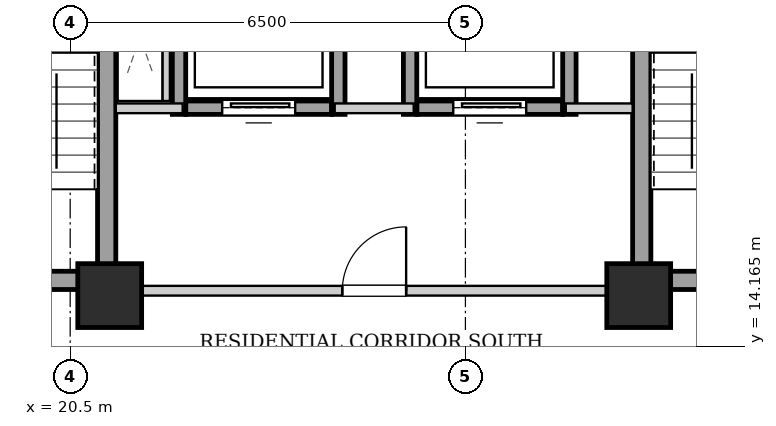
"""IFC4 building model, lengths in metres.
Left out: names, types, materials, properties, quantities, classifications, styles, units other than length and angle.
Written with IfcOpenShell. Run it as: python <this file> out.ifc"""

import sys

from ifc_helpers import new_model, si_unit, direction, frame, frame_2d, origin, origin_2d, place, context, subcontext, project, spatial, rectangle, extrude, element, fill, save


model = new_model("IFC4")
c1 = context("Model", 3, precision=1e-05, world=origin(), true_north=direction((0.0, 1.0)))
c2 = subcontext(c1, "Body", "Model", "MODEL_VIEW")
j1 = project(units=[si_unit("LENGTHUNIT", "METRE"), si_unit("PLANEANGLEUNIT", "RADIAN")], contexts=[c1])
p1 = place(None, origin())
s1 = spatial("IfcSite", under=j1, at=p1, CompositionType="ELEMENT")
p2 = place(p1, origin())
s2 = spatial("IfcBuilding", under=s1, at=p2, CompositionType="ELEMENT")
p3 = place(p2, frame((0.0, 0.0, 107.1)))
s3 = spatial("IfcBuildingStorey", under=s2, at=p3, CompositionType="ELEMENT", Elevation=107.1)
for number, where, z_axis, x_axis in (
    (1, (21.15, 15.0, 0.0), (0.0, 0.0, 1.0), (1.0, 0.0, 0.0)),
    (2, (29.85, 15.0, 0.0), (0.0, 0.0, 1.0), (1.0, 0.0, 0.0)),
):
    element("IfcColumn", number, at=place(p3, frame(where, z_axis=z_axis, x_axis=x_axis)), inside=s3, PredefinedType="COLUMN", context=c2, shape_type="SweptSolid", body=[
        extrude(rectangle(XDim=1.05, YDim=1.05, at=origin_2d()), origin(), (0.0, 0.0, 1.0), 3.2),
    ])
p4 = place(p3, frame((21.1, 15.1, 0.0), z_axis=(0.0, 0.0, 1.0), x_axis=(0.0, 1.0, 0.0)))
e3 = element("IfcWall", 3, at=p4, inside=s3, PredefinedType="SHEAR", context=c2, shape_type="SweptSolid", body=[
    extrude(rectangle(XDim=9.0, YDim=0.3, at=frame_2d((4.5, 0.0))), origin(), (0.0, 0.0, 1.0), 2.94),
])
p5 = place(p3, frame((18.1, 15.25, 0.0), z_axis=(0.0, 0.0, 1.0), x_axis=(1.0, 0.0, 0.0)))
e4 = element("IfcWall", 4, at=p5, inside=s3, PredefinedType="SHEAR", context=c2, shape_type="SweptSolid", body=[
    extrude(rectangle(XDim=2.85, YDim=0.3, at=frame_2d((1.425, 0.0))), origin(), (0.0, 0.0, 1.0), 2.94),
])
p6 = place(p5, frame((0.86, 0.0, 0.0)))
e5 = element("IfcOpeningElement", 5, at=p6, cuts=e4, PredefinedType="OPENING", context=c2, shape_type="SweptSolid", body=[
    extrude(rectangle(XDim=1.1, YDim=2.05, at=frame_2d((0.55, 1.025))), frame((0.0, 0.16, 0.0), z_axis=(0.0, -1.0, 0.0), x_axis=(1.0, 0.0, 0.0)), (0.0, 0.0, 1.0), 0.32),
])
p7 = place(p3, frame((29.9, 15.1, 0.0), z_axis=(0.0, 0.0, 1.0), x_axis=(0.0, 1.0, 0.0)))
e6 = element("IfcWall", 6, at=p7, inside=s3, PredefinedType="SHEAR", context=c2, shape_type="SweptSolid", body=[
    extrude(rectangle(XDim=9.0, YDim=0.3, at=frame_2d((4.5, 0.0))), origin(), (0.0, 0.0, 1.0), 2.94),
])
p8 = place(p3, frame((30.05, 15.25, 0.0), z_axis=(0.0, 0.0, 1.0), x_axis=(1.0, 0.0, 0.0)))
e7 = element("IfcWall", 7, at=p8, inside=s3, PredefinedType="SHEAR", context=c2, shape_type="SweptSolid", body=[
    extrude(rectangle(XDim=2.85, YDim=0.3, at=frame_2d((1.425, 0.0))), origin(), (0.0, 0.0, 1.0), 2.94),
])
p9 = place(p8, frame((0.86, 0.0, 0.0)))
e8 = element("IfcOpeningElement", 8, at=p9, cuts=e7, PredefinedType="OPENING", context=c2, shape_type="SweptSolid", body=[
    extrude(rectangle(XDim=1.1, YDim=2.05, at=frame_2d((0.55, 1.025))), frame((0.0, 0.16, 0.0), z_axis=(0.0, -1.0, 0.0), x_axis=(1.0, 0.0, 0.0)), (0.0, 0.0, 1.0), 0.32),
])
p10 = place(p3, frame((22.4, 18.09, 0.0), z_axis=(0.0, 0.0, 1.0), x_axis=(1.0, 0.0, 0.0)))
e9 = element("IfcWall", 9, at=p10, inside=s3, PredefinedType="SHEAR", context=c2, shape_type="SweptSolid", body=[
    extrude(rectangle(XDim=2.4, YDim=0.22, at=frame_2d((1.2, 0.0))), origin(), (0.0, 0.0, 1.0), 2.94),
])
p11 = place(p10, frame((0.6, 0.0, 0.0)))
e10 = element("IfcOpeningElement", 10, at=p11, cuts=e9, PredefinedType="OPENING", context=c2, shape_type="SweptSolid", body=[
    extrude(rectangle(XDim=1.2, YDim=2.15, at=frame_2d((0.6, 1.075))), frame((0.0, 0.12, 0.0), z_axis=(0.0, -1.0, 0.0), x_axis=(1.0, 0.0, 0.0)), (0.0, 0.0, 1.0), 0.24),
])
for number, where, z_axis, x_axis in (
    (11, (22.29, 17.98, 0.0), (0.0, 0.0, 1.0), (0.0, 1.0, 0.0)),
    (12, (24.91, 17.98, 0.0), (0.0, 0.0, 1.0), (0.0, 1.0, 0.0)),
):
    element("IfcWall", number, at=place(p3, frame(where, z_axis=z_axis, x_axis=x_axis)), inside=s3, PredefinedType="SHEAR", context=c2, shape_type="SweptSolid", body=[
        extrude(rectangle(XDim=2.54, YDim=0.22, at=frame_2d((1.27, 0.0))), origin(), (0.0, 0.0, 1.0), 2.94),
    ])
p12 = place(p3, frame((26.2, 18.09, 0.0), z_axis=(0.0, 0.0, 1.0), x_axis=(1.0, 0.0, 0.0)))
e13 = element("IfcWall", 13, at=p12, inside=s3, PredefinedType="SHEAR", context=c2, shape_type="SweptSolid", body=[
    extrude(rectangle(XDim=2.4, YDim=0.22, at=frame_2d((1.2, 0.0))), origin(), (0.0, 0.0, 1.0), 2.94),
])
p13 = place(p12, frame((0.6, 0.0, 0.0)))
e14 = element("IfcOpeningElement", 14, at=p13, cuts=e13, PredefinedType="OPENING", context=c2, shape_type="SweptSolid", body=[
    extrude(rectangle(XDim=1.2, YDim=2.15, at=frame_2d((0.6, 1.075))), frame((0.0, 0.12, 0.0), z_axis=(0.0, -1.0, 0.0), x_axis=(1.0, 0.0, 0.0)), (0.0, 0.0, 1.0), 0.24),
])
for number, where, z_axis, x_axis in (
    (15, (26.09, 17.98, 0.0), (0.0, 0.0, 1.0), (0.0, 1.0, 0.0)),
    (16, (28.71, 17.98, 0.0), (0.0, 0.0, 1.0), (0.0, 1.0, 0.0)),
):
    element("IfcWall", number, at=place(p3, frame(where, z_axis=z_axis, x_axis=x_axis)), inside=s3, PredefinedType="SHEAR", context=c2, shape_type="SweptSolid", body=[
        extrude(rectangle(XDim=2.54, YDim=0.22, at=frame_2d((1.27, 0.0))), origin(), (0.0, 0.0, 1.0), 2.94),
    ])
p14 = place(p3, frame((21.25, 15.08, 0.0), z_axis=(0.0, 0.0, 1.0), x_axis=(1.0, 0.0, 0.0)))
e17 = element("IfcWall", 17, at=p14, inside=s3, PredefinedType="PARTITIONING", context=c2, shape_type="SweptSolid", body=[
    extrude(rectangle(XDim=8.5, YDim=0.16, at=frame_2d((4.25, 0.0))), origin(), (0.0, 0.0, 1.0), 2.313),
])
p15 = place(p14, frame((3.725, 0.0, 0.0)))
e18 = element("IfcOpeningElement", 18, at=p15, cuts=e17, PredefinedType="OPENING", context=c2, shape_type="SweptSolid", body=[
    extrude(rectangle(XDim=1.05, YDim=2.05, at=frame_2d((0.525, 1.025))), frame((0.0, 0.09, 0.0), z_axis=(0.0, -1.0, 0.0), x_axis=(1.0, 0.0, 0.0)), (0.0, 0.0, 1.0), 0.18),
])
p16 = place(p3, frame((21.25, 18.08, 0.0), z_axis=(0.0, 0.0, 1.0), x_axis=(1.0, 0.0, 0.0)))
e19 = element("IfcWall", 19, at=p16, inside=s3, PredefinedType="PARTITIONING", context=c2, shape_type="SweptSolid", body=[
    extrude(rectangle(XDim=1.1, YDim=0.16, at=frame_2d((0.55, 0.0))), origin(), (0.0, 0.0, 1.0), 2.94),
])
p17 = place(p3, frame((24.85, 18.08, 0.0), z_axis=(0.0, 0.0, 1.0), x_axis=(1.0, 0.0, 0.0)))
e20 = element("IfcWall", 20, at=p17, inside=s3, PredefinedType="PARTITIONING", context=c2, shape_type="SweptSolid", body=[
    extrude(rectangle(XDim=1.3, YDim=0.16, at=frame_2d((0.65, 0.0))), origin(), (0.0, 0.0, 1.0), 2.94),
])
p18 = place(p3, frame((28.65, 18.08, 0.0), z_axis=(0.0, 0.0, 1.0), x_axis=(1.0, 0.0, 0.0)))
e21 = element("IfcWall", 21, at=p18, inside=s3, PredefinedType="PARTITIONING", context=c2, shape_type="SweptSolid", body=[
    extrude(rectangle(XDim=1.1, YDim=0.16, at=frame_2d((0.55, 0.0))), origin(), (0.0, 0.0, 1.0), 2.94),
])
p19 = place(p3, frame((22.08, 18.2, 0.0), z_axis=(0.0, 0.0, 1.0), x_axis=(0.0, 1.0, 0.0)))
e22 = element("IfcWall", 22, at=p19, inside=s3, PredefinedType="PARTITIONING", context=c2, shape_type="SweptSolid", body=[
    extrude(rectangle(XDim=2.12, YDim=0.12, at=frame_2d((1.06, 0.0))), origin(), (0.0, 0.0, 1.0), 2.94),
])
p20 = place(p11, origin())
e23 = element("IfcDoor", 23, at=p20, inside=s3, OperationType="SLIDING_TO_LEFT", PredefinedType="DOOR", context=c2, shape_type="SweptSolid", body=[
    extrude(rectangle(XDim=1.2, YDim=2.15, at=frame_2d((0.6, 1.075))), frame((0.0, 0.025, 0.0), z_axis=(0.0, -1.0, 0.0), x_axis=(1.0, 0.0, 0.0)), (0.0, 0.0, 1.0), 0.05),
])
fill(e10, e23)
p21 = place(p13, origin())
e24 = element("IfcDoor", 24, at=p21, inside=s3, OperationType="SLIDING_TO_LEFT", PredefinedType="DOOR", context=c2, shape_type="SweptSolid", body=[
    extrude(rectangle(XDim=1.2, YDim=2.15, at=frame_2d((0.6, 1.075))), frame((0.0, 0.025, 0.0), z_axis=(0.0, -1.0, 0.0), x_axis=(1.0, 0.0, 0.0)), (0.0, 0.0, 1.0), 0.05),
])
fill(e14, e24)
p22 = place(p15, origin())
e25 = element("IfcDoor", 25, at=p22, inside=s3, OperationType="SINGLE_SWING_RIGHT", PredefinedType="DOOR", context=c2, shape_type="SweptSolid", body=[
    extrude(rectangle(XDim=1.05, YDim=2.05, at=frame_2d((0.525, 1.025))), frame((0.0, 0.025, 0.0), z_axis=(0.0, -1.0, 0.0), x_axis=(1.0, 0.0, 0.0)), (0.0, 0.0, 1.0), 0.05),
])
fill(e18, e25)
save(model, sys.argv[1])
